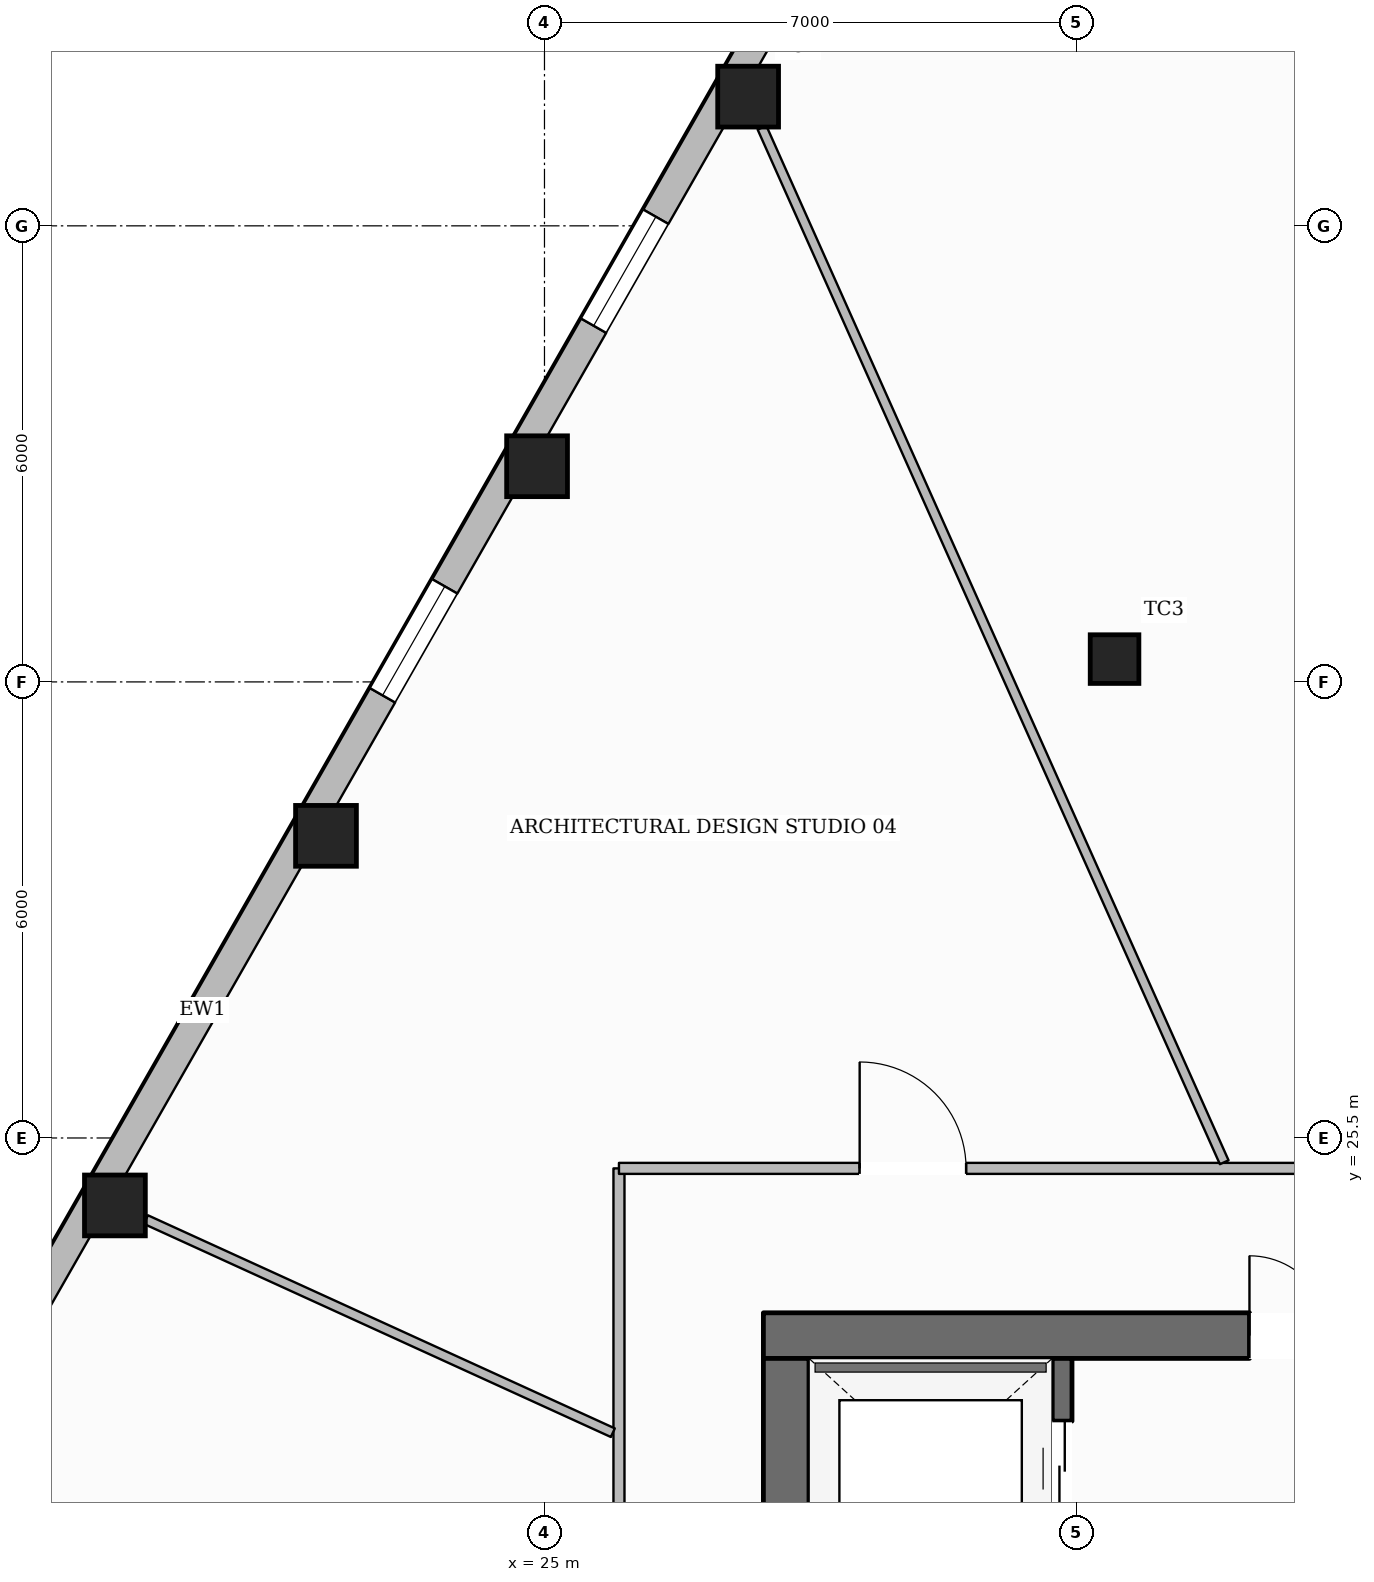
"""IFC4 building model, lengths in metres.
Left out: names, types, materials, properties, quantities, classifications, styles, units other than length and angle.
Written with IfcOpenShell. Run it as: python <this file> out.ifc"""

import sys

from ifc_helpers import new_model, si_unit, direction, frame, frame_2d, origin, origin_2d, place, context, subcontext, project, spatial, rectangle, hollow_rectangle, extrude, element, fill, save


model = new_model("IFC4")
c1 = context("Model", 3, precision=1e-05, world=origin(), true_north=direction((0.0, 1.0)))
c2 = subcontext(c1, "Body", "Model", "MODEL_VIEW")
j1 = project(units=[si_unit("LENGTHUNIT", "METRE"), si_unit("PLANEANGLEUNIT", "RADIAN")], contexts=[c1])
p1 = place(None, origin())
s1 = spatial("IfcSite", under=j1, at=p1, CompositionType="ELEMENT")
p2 = place(p1, origin())
s2 = spatial("IfcBuilding", under=s1, at=p2, CompositionType="ELEMENT")
p3 = place(p2, frame((0.0, 0.0, 40.65)))
s3 = spatial("IfcBuildingStorey", under=s2, at=p3, CompositionType="ELEMENT", Elevation=40.65)
p4 = place(p3, frame((27.88, 22.9, 0.0), z_axis=(0.0, 0.0, 1.0), x_axis=(1.0, 0.0, 0.0)))
e1 = element("IfcWall", 1, at=p4, inside=s3, PredefinedType="SOLIDWALL", context=c2, shape_type="SweptSolid", body=[
    extrude(rectangle(XDim=20.24, YDim=0.6, at=frame_2d((10.12, 0.0))), origin(), (0.0, 0.0, 1.0), 3.59),
])
p5 = place(p4, frame((6.395, 0.0, 0.0)))
e2 = element("IfcOpeningElement", 2, at=p5, cuts=e1, PredefinedType="OPENING", context=c2, shape_type="SweptSolid", body=[
    extrude(rectangle(XDim=1.05, YDim=2.15, at=frame_2d((0.525, 1.075))), frame((0.0, 0.31, 0.0), z_axis=(0.0, -1.0, 0.0), x_axis=(1.0, 0.0, 0.0)), (0.0, 0.0, 1.0), 0.62),
])
p6 = place(p4, frame((12.795, 0.0, 0.0)))
e3 = element("IfcOpeningElement", 3, at=p6, cuts=e1, PredefinedType="OPENING", context=c2, shape_type="SweptSolid", body=[
    extrude(rectangle(XDim=1.05, YDim=2.15, at=frame_2d((0.525, 1.075))), frame((0.0, 0.31, 0.0), z_axis=(0.0, -1.0, 0.0), x_axis=(1.0, 0.0, 0.0)), (0.0, 0.0, 1.0), 0.62),
])
p7 = place(p3, frame((28.18, 9.6, 0.0), z_axis=(0.0, 0.0, 1.0), x_axis=(0.0, 1.0, 0.0)))
e4 = element("IfcWall", 4, at=p7, inside=s3, PredefinedType="SOLIDWALL", context=c2, shape_type="SweptSolid", body=[
    extrude(rectangle(XDim=13.0, YDim=0.6, at=frame_2d((6.5, 0.0))), origin(), (0.0, 0.0, 1.0), 3.59),
])
p8 = place(p7, frame((0.2, 0.0, 0.0)))
e5 = element("IfcOpeningElement", 5, at=p8, cuts=e4, PredefinedType="OPENING", context=c2, shape_type="SweptSolid", body=[
    extrude(rectangle(XDim=1.1, YDim=2.15, at=frame_2d((0.55, 1.075))), frame((0.0, 0.31, 0.0), z_axis=(0.0, -1.0, 0.0), x_axis=(1.0, 0.0, 0.0)), (0.0, 0.0, 1.0), 0.62),
])
p9 = place(p7, frame((8.4, 0.0, 0.0)))
e6 = element("IfcOpeningElement", 6, at=p9, cuts=e4, PredefinedType="OPENING", context=c2, shape_type="SweptSolid", body=[
    extrude(rectangle(XDim=0.9, YDim=2.1, at=frame_2d((0.45, 1.05))), frame((0.0, 0.31, 0.0), z_axis=(0.0, -1.0, 0.0), x_axis=(1.0, 0.0, 0.0)), (0.0, 0.0, 1.0), 0.62),
])
p10 = place(p3, frame((31.81, 9.6, 0.0), z_axis=(0.0, 0.0, 1.0), x_axis=(0.0, 1.0, 0.0)))
e7 = element("IfcWall", 7, at=p10, inside=s3, PredefinedType="SHEAR", context=c2, shape_type="SweptSolid", body=[
    extrude(rectangle(XDim=13.0, YDim=0.26, at=frame_2d((6.5, 0.0))), origin(), (0.0, 0.0, 1.0), 3.59),
])
p11 = place(p10, frame((10.925, 0.0, 0.0)))
e8 = element("IfcOpeningElement", 8, at=p11, cuts=e7, PredefinedType="OPENING", context=c2, shape_type="SweptSolid", body=[
    extrude(rectangle(XDim=1.25, YDim=2.25, at=frame_2d((0.625, 1.125))), frame((0.0, 0.14, 0.0), z_axis=(0.0, -1.0, 0.0), x_axis=(1.0, 0.0, 0.0)), (0.0, 0.0, 1.0), 0.28),
])
for number, where, z_axis, x_axis in (
    (9, (27.679, 39.2, 0.0), (0.0, 0.0, 1.0), (1.0, 0.0, 0.0)),
    (10, (24.902, 34.337, 0.0), (0.0, 0.0, 1.0), (1.0, 0.0, 0.0)),
    (11, (22.125, 29.475, 0.0), (0.0, 0.0, 1.0), (1.0, 0.0, 0.0)),
    (12, (19.349, 24.613, 0.0), (0.0, 0.0, 1.0), (1.0, 0.0, 0.0)),
):
    element("IfcColumn", number, at=place(p3, frame(where, z_axis=z_axis, x_axis=x_axis)), inside=s3, PredefinedType="COLUMN", context=c2, shape_type="SweptSolid", body=[
        extrude(hollow_rectangle(XDim=0.8, YDim=0.8, WallThickness=0.036, at=origin_2d()), origin(), (0.0, 0.0, 1.0), 3.59),
    ])
p12 = place(p3, frame((32.5, 31.8, 0.0), z_axis=(0.0, 0.0, 1.0), x_axis=(1.0, 0.0, 0.0)))
e13 = element("IfcColumn", 13, at=p12, inside=s3, PredefinedType="COLUMN", context=c2, shape_type="SweptSolid", body=[
    extrude(hollow_rectangle(XDim=0.64, YDim=0.64, WallThickness=0.028, at=origin_2d()), origin(), (0.0, 0.0, 1.0), 3.59),
])
p13 = place(p3, frame((13.324, 14.608, 0.0), z_axis=(0.0, 0.0, 1.0), x_axis=(0.495909124573, 0.868374423947, 0.0)))
e14 = element("IfcWall", 14, at=p13, inside=s3, PredefinedType="STANDARD", context=c2, shape_type="SweptSolid", body=[
    extrude(rectangle(XDim=34.553, YDim=0.38, at=frame_2d((17.277, 0.0))), origin(), (0.0, 0.0, 1.0), 2.97),
])
p14 = place(p13, frame((30.448, 0.0, 0.65)))
e15 = element("IfcOpeningElement", 15, at=p14, cuts=e14, PredefinedType="OPENING", context=c2, shape_type="SweptSolid", body=[
    extrude(rectangle(XDim=1.65, YDim=1.75, at=frame_2d((0.825, 0.875))), frame((0.0, 0.2, 0.0), z_axis=(0.0, -1.0, 0.0), x_axis=(1.0, 0.0, 0.0)), (0.0, 0.0, 1.0), 0.4),
])
p15 = place(p13, frame((24.849, 0.0, 0.65)))
e16 = element("IfcOpeningElement", 16, at=p15, cuts=e14, PredefinedType="OPENING", context=c2, shape_type="SweptSolid", body=[
    extrude(rectangle(XDim=1.65, YDim=1.75, at=frame_2d((0.825, 0.875))), frame((0.0, 0.2, 0.0), z_axis=(0.0, -1.0, 0.0), x_axis=(1.0, 0.0, 0.0)), (0.0, 0.0, 1.0), 0.4),
])
p16 = place(p13, frame((19.249, 0.0, 0.65)))
e17 = element("IfcOpeningElement", 17, at=p16, cuts=e14, PredefinedType="OPENING", context=c2, shape_type="SweptSolid", body=[
    extrude(rectangle(XDim=1.65, YDim=1.75, at=frame_2d((0.825, 0.875))), frame((0.0, 0.2, 0.0), z_axis=(0.0, -1.0, 0.0), x_axis=(1.0, 0.0, 0.0)), (0.0, 0.0, 1.0), 0.4),
])
p17 = place(p13, frame((8.05, 0.0, 0.65)))
e18 = element("IfcOpeningElement", 18, at=p17, cuts=e14, PredefinedType="OPENING", context=c2, shape_type="SweptSolid", body=[
    extrude(rectangle(XDim=1.65, YDim=1.75, at=frame_2d((0.825, 0.875))), frame((0.0, 0.2, 0.0), z_axis=(0.0, -1.0, 0.0), x_axis=(1.0, 0.0, 0.0)), (0.0, 0.0, 1.0), 0.4),
])
p18 = place(p13, frame((2.451, 0.0, 0.65)))
e19 = element("IfcOpeningElement", 19, at=p18, cuts=e14, PredefinedType="OPENING", context=c2, shape_type="SweptSolid", body=[
    extrude(rectangle(XDim=1.65, YDim=1.75, at=frame_2d((0.825, 0.875))), frame((0.0, 0.2, 0.0), z_axis=(0.0, -1.0, 0.0), x_axis=(1.0, 0.0, 0.0)), (0.0, 0.0, 1.0), 0.4),
])
p19 = place(p3, frame((25.98, 9.1, 0.0), z_axis=(0.0, 0.0, 1.0), x_axis=(0.0, 1.0, 0.0)))
e20 = element("IfcWall", 20, at=p19, inside=s3, PredefinedType="PARTITIONING", context=c2, shape_type="SweptSolid", body=[
    extrude(rectangle(XDim=16.0, YDim=0.145, at=frame_2d((8.0, 0.0))), origin(), (0.0, 0.0, 1.0), 3.278),
])
p20 = place(p19, frame((5.844, 0.0, 0.0)))
e21 = element("IfcOpeningElement", 21, at=p20, cuts=e20, PredefinedType="OPENING", context=c2, shape_type="SweptSolid", body=[
    extrude(rectangle(XDim=1.4, YDim=2.2, at=frame_2d((0.7, 1.1))), frame((0.0, 0.083, 0.0), z_axis=(0.0, -1.0, 0.0), x_axis=(1.0, 0.0, 0.0)), (0.0, 0.0, 1.0), 0.165),
])
p21 = place(p3, frame((25.98, 25.1, 0.0), z_axis=(0.0, 0.0, 1.0), x_axis=(1.0, 0.0, 0.0)))
e22 = element("IfcWall", 22, at=p21, inside=s3, PredefinedType="PARTITIONING", context=c2, shape_type="SweptSolid", body=[
    extrude(rectangle(XDim=11.02, YDim=0.145, at=frame_2d((5.51, 0.0))), origin(), (0.0, 0.0, 1.0), 3.59),
])
p22 = place(p21, frame((3.167, 0.0, 0.0)))
e23 = element("IfcOpeningElement", 23, at=p22, cuts=e22, PredefinedType="OPENING", context=c2, shape_type="SweptSolid", body=[
    extrude(rectangle(XDim=1.4, YDim=2.2, at=frame_2d((0.7, 1.1))), frame((0.0, 0.083, 0.0), z_axis=(0.0, -1.0, 0.0), x_axis=(1.0, 0.0, 0.0)), (0.0, 0.0, 1.0), 0.165),
])
p23 = place(p3, frame((33.943, 25.18, 0.0), z_axis=(0.0, 0.0, 1.0), x_axis=(-0.407913921954, 0.913020389847, 0.0)))
e24 = element("IfcWall", 24, at=p23, inside=s3, PredefinedType="PARTITIONING", context=c2, shape_type="SweptSolid", body=[
    extrude(rectangle(XDim=14.908, YDim=0.125, at=frame_2d((7.454, 0.0))), origin(), (0.0, 0.0, 1.0), 3.057),
])
p24 = place(p3, frame((25.899, 21.623, 0.0), z_axis=(0.0, 0.0, 1.0), x_axis=(-0.909736399744, 0.415186323209, 0.0)))
e25 = element("IfcWall", 25, at=p24, inside=s3, PredefinedType="PARTITIONING", context=c2, shape_type="SweptSolid", body=[
    extrude(rectangle(XDim=6.752, YDim=0.125, at=frame_2d((3.376, 0.0))), origin(), (0.0, 0.0, 1.0), 3.057),
])
p25 = place(p15, origin())
e26 = element("IfcWindow", 26, at=p25, inside=s3, PartitioningType="SINGLE_PANEL", PredefinedType="WINDOW", context=c2, shape_type="SweptSolid", body=[
    extrude(rectangle(XDim=1.65, YDim=1.75, at=frame_2d((0.825, 0.875))), frame((0.0, 0.03, 0.0), z_axis=(0.0, -1.0, 0.0), x_axis=(1.0, 0.0, 0.0)), (0.0, 0.0, 1.0), 0.06),
])
fill(e16, e26)
p26 = place(p16, origin())
e27 = element("IfcWindow", 27, at=p26, inside=s3, PartitioningType="SINGLE_PANEL", PredefinedType="WINDOW", context=c2, shape_type="SweptSolid", body=[
    extrude(rectangle(XDim=1.65, YDim=1.75, at=frame_2d((0.825, 0.875))), frame((0.0, 0.03, 0.0), z_axis=(0.0, -1.0, 0.0), x_axis=(1.0, 0.0, 0.0)), (0.0, 0.0, 1.0), 0.06),
])
fill(e17, e27)
p27 = place(p5, origin())
e28 = element("IfcDoor", 28, at=p27, inside=s3, OperationType="SINGLE_SWING_LEFT", PredefinedType="DOOR", context=c2, shape_type="SweptSolid", body=[
    extrude(rectangle(XDim=1.05, YDim=2.15, at=frame_2d((0.525, 1.075))), frame((0.0, 0.025, 0.0), z_axis=(0.0, -1.0, 0.0), x_axis=(1.0, 0.0, 0.0)), (0.0, 0.0, 1.0), 0.05),
])
fill(e2, e28)
p28 = place(p11, origin())
e29 = element("IfcDoor", 29, at=p28, inside=s3, OperationType="DOUBLE_DOOR_SLIDING", PredefinedType="DOOR", context=c2, shape_type="SweptSolid", body=[
    extrude(rectangle(XDim=1.25, YDim=2.25, at=frame_2d((0.625, 1.125))), frame((0.0, 0.025, 0.0), z_axis=(0.0, -1.0, 0.0), x_axis=(1.0, 0.0, 0.0)), (0.0, 0.0, 1.0), 0.05),
])
fill(e8, e29)
p29 = place(p22, origin())
e30 = element("IfcDoor", 30, at=p29, inside=s3, OperationType="SINGLE_SWING_LEFT", PredefinedType="DOOR", context=c2, shape_type="SweptSolid", body=[
    extrude(rectangle(XDim=1.4, YDim=2.2, at=frame_2d((0.7, 1.1))), frame((0.0, 0.025, 0.0), z_axis=(0.0, -1.0, 0.0), x_axis=(1.0, 0.0, 0.0)), (0.0, 0.0, 1.0), 0.05),
])
fill(e23, e30)
save(model, sys.argv[1])
